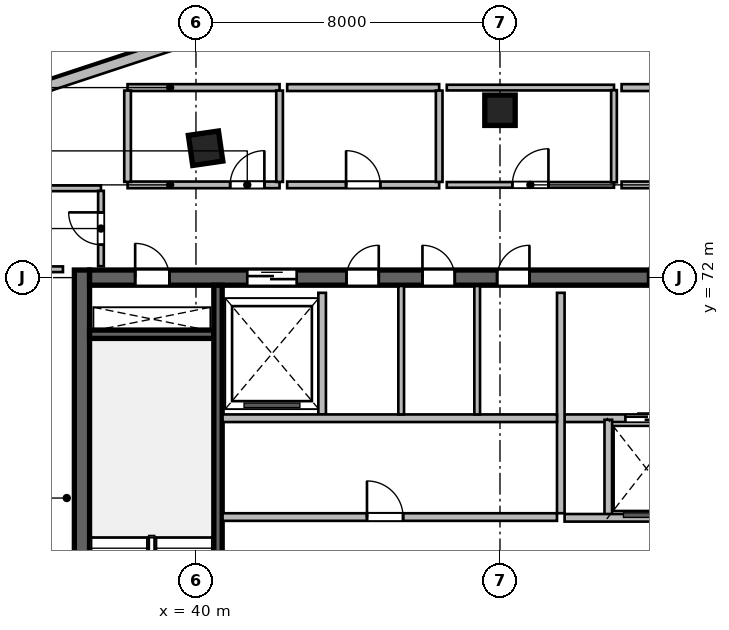
"""IFC4 building model, lengths in metres.
Left out: names, types, materials, properties, quantities, classifications, styles, units other than length and angle.
Written with IfcOpenShell. Run it as: python <this file> out.ifc"""

import sys

from ifc_helpers import new_model, si_unit, direction, frame, frame_2d, origin, origin_2d, place, context, subcontext, project, spatial, rectangle, extrude, source, transform, mapped, element, fill, save


model = new_model("IFC4")
c1 = context("Model", 3, precision=1e-05, world=origin(), true_north=direction((0.0, 1.0)))
c2 = subcontext(c1, "Body", "Model", "MODEL_VIEW")
j1 = project(units=[si_unit("LENGTHUNIT", "METRE"), si_unit("PLANEANGLEUNIT", "RADIAN")], contexts=[c1])
p1 = place(None, origin())
s1 = spatial("IfcSite", under=j1, at=p1, CompositionType="ELEMENT")
p2 = place(p1, origin())
s2 = spatial("IfcBuilding", under=s1, at=p2, CompositionType="ELEMENT")
p3 = place(p2, frame((0.0, 0.0, 271.8)))
s3 = spatial("IfcBuildingStorey", under=s2, at=p3, CompositionType="ELEMENT", Elevation=271.8)
m1 = source(origin(), c2, "Body", "SweptSolid", [
    extrude(rectangle(XDim=12.0, YDim=0.4, at=frame_2d((6.0, 0.0))), origin(), (0.0, 0.0, 1.0), 3.9),
])
p4 = place(p3, frame((37.0, 60.2, 0.0), z_axis=(0.0, 0.0, 1.0), x_axis=(0.0, 1.0, 0.0)))
e1 = element("IfcWall", 1, at=p4, inside=s3, PredefinedType="SHEAR", context=c2, shape_type="MappedRepresentation", body=[
    mapped(m1, transform((0.0, 0.0, 0.0), scale=1.0)),
])
m2 = source(origin(), c2, "Body", "SweptSolid", [
    extrude(rectangle(XDim=21.6, YDim=0.4, at=frame_2d((10.8, 0.0))), origin(), (0.0, 0.0, 1.0), 3.9),
])
p5 = place(p3, frame((37.2, 72.0, 0.0), z_axis=(0.0, 0.0, 1.0), x_axis=(1.0, 0.0, 0.0)))
e2 = element("IfcWall", 2, at=p5, inside=s3, PredefinedType="SHEAR", context=c2, shape_type="MappedRepresentation", body=[
    mapped(m2, transform((0.0, 0.0, 0.0), scale=1.0)),
])
p6 = place(p5, frame((1.2, 0.0, 0.0)))
e3 = element("IfcOpeningElement", 3, at=p6, cuts=e2, PredefinedType="OPENING", context=c2, shape_type="SweptSolid", body=[
    extrude(rectangle(XDim=0.9, YDim=2.1, at=frame_2d((0.45, 1.05))), frame((0.0, 0.21, 0.0), z_axis=(0.0, -1.0, 0.0), x_axis=(1.0, 0.0, 0.0)), (0.0, 0.0, 1.0), 0.42),
])
p7 = place(p5, frame((14.7, 0.0, 0.0)))
e4 = element("IfcOpeningElement", 4, at=p7, cuts=e2, PredefinedType="OPENING", context=c2, shape_type="SweptSolid", body=[
    extrude(rectangle(XDim=1.2, YDim=2.15, at=frame_2d((0.6, 1.075))), frame((0.0, 0.21, 0.0), z_axis=(0.0, -1.0, 0.0), x_axis=(1.0, 0.0, 0.0)), (0.0, 0.0, 1.0), 0.42),
])
p8 = place(p5, frame((4.15, 0.0, 0.0)))
e5 = element("IfcOpeningElement", 5, at=p8, cuts=e2, PredefinedType="OPENING", context=c2, shape_type="SweptSolid", body=[
    extrude(rectangle(XDim=1.3, YDim=2.15, at=frame_2d((0.65, 1.075))), frame((0.0, 0.21, 0.0), z_axis=(0.0, -1.0, 0.0), x_axis=(1.0, 0.0, 0.0)), (0.0, 0.0, 1.0), 0.42),
])
p9 = place(p5, frame((6.76, 0.0, 0.0)))
e6 = element("IfcOpeningElement", 6, at=p9, cuts=e2, PredefinedType="OPENING", context=c2, shape_type="SweptSolid", body=[
    extrude(rectangle(XDim=0.85, YDim=2.1, at=frame_2d((0.425, 1.05))), frame((0.0, 0.21, 0.0), z_axis=(0.0, -1.0, 0.0), x_axis=(1.0, 0.0, 0.0)), (0.0, 0.0, 1.0), 0.42),
])
p10 = place(p5, frame((8.76, 0.0, 0.0)))
e7 = element("IfcOpeningElement", 7, at=p10, cuts=e2, PredefinedType="OPENING", context=c2, shape_type="SweptSolid", body=[
    extrude(rectangle(XDim=0.85, YDim=2.1, at=frame_2d((0.425, 1.05))), frame((0.0, 0.21, 0.0), z_axis=(0.0, -1.0, 0.0), x_axis=(1.0, 0.0, 0.0)), (0.0, 0.0, 1.0), 0.42),
])
p11 = place(p5, frame((10.725, 0.0, 0.0)))
e8 = element("IfcOpeningElement", 8, at=p11, cuts=e2, PredefinedType="OPENING", context=c2, shape_type="SweptSolid", body=[
    extrude(rectangle(XDim=0.85, YDim=2.1, at=frame_2d((0.425, 1.05))), frame((0.0, 0.21, 0.0), z_axis=(0.0, -1.0, 0.0), x_axis=(1.0, 0.0, 0.0)), (0.0, 0.0, 1.0), 0.42),
])
m3 = source(origin(), c2, "Body", "SweptSolid", [
    extrude(rectangle(XDim=3.27, YDim=0.22, at=frame_2d((1.635, 0.0))), origin(), (0.0, 0.0, 1.0), 3.9),
])
p12 = place(p3, frame((37.2, 70.51, 0.0), z_axis=(0.0, 0.0, 1.0), x_axis=(1.0, 0.0, 0.0)))
e9 = element("IfcWall", 9, at=p12, inside=s3, PredefinedType="SHEAR", context=c2, shape_type="MappedRepresentation", body=[
    mapped(m3, transform((0.0, 0.0, 0.0), scale=1.0)),
])
m4 = source(origin(), c2, "Body", "SweptSolid", [
    extrude(rectangle(XDim=11.2, YDim=0.22, at=frame_2d((5.6, 0.0))), origin(), (0.0, 0.0, 1.0), 3.9),
])
p13 = place(p3, frame((40.58, 60.6, 0.0), z_axis=(0.0, 0.0, 1.0), x_axis=(0.0, 1.0, 0.0)))
e10 = element("IfcWall", 10, at=p13, inside=s3, PredefinedType="SHEAR", context=c2, shape_type="MappedRepresentation", body=[
    mapped(m4, transform((0.0, 0.0, 0.0), scale=1.0)),
])
m5 = source(origin(), c2, "Body", "SweptSolid", [
    extrude(rectangle(XDim=0.8, YDim=0.8, at=origin_2d()), origin(), (0.0, 0.0, 1.0), 3.9),
])
for number, where, z_axis, x_axis in (
    (11, (40.253, 75.404, 0.0), (0.0, 0.0, 1.0), (-0.143, 0.99, 0.0)),
    (12, (48.0, 76.404, 0.0), (0.0, 0.0, 1.0), (0.0, 1.0, 0.0)),
):
    element("IfcColumn", number, at=place(p3, frame(where, z_axis=z_axis, x_axis=x_axis)), inside=s3, PredefinedType="COLUMN", context=c2, shape_type="MappedRepresentation", body=[
        mapped(m5, transform((0.0, 0.0, 0.0), scale=1.0)),
    ])
m6 = source(origin(), c2, "Body", "SweptSolid", [
    extrude(rectangle(XDim=3.54, YDim=0.28, at=frame_2d((1.77, 0.0))), origin(), (0.0, 0.0, 1.0), 3.64),
])
p14 = place(p3, frame((36.132, 77.049, 0.0), z_axis=(0.0, 0.0, 1.0), x_axis=(0.949678507031, 0.313226329165, 0.0)))
e13 = element("IfcWall", 13, at=p14, inside=s3, PredefinedType="SOLIDWALL", context=c2, shape_type="MappedRepresentation", body=[
    mapped(m6, transform((0.0, 0.0, 0.0), scale=1.0)),
])
m7 = source(origin(), c2, "Body", "SweptSolid", [
    extrude(rectangle(XDim=5.62, YDim=0.2, at=frame_2d((2.81, 0.0))), origin(), (0.0, 0.0, 1.0), 3.64),
])
p15 = place(p3, frame((49.7, 68.3, 0.0), z_axis=(0.0, 0.0, 1.0), x_axis=(1.0, 0.0, 0.0)))
e14 = element("IfcWall", 14, at=p15, inside=s3, PredefinedType="SOLIDWALL", context=c2, shape_type="MappedRepresentation", body=[
    mapped(m7, transform((0.0, 0.0, 0.0), scale=1.0)),
])
p16 = place(p15, frame((1.6, 0.0, 0.0)))
e15 = element("IfcOpeningElement", 15, at=p16, cuts=e14, PredefinedType="OPENING", context=c2, shape_type="SweptSolid", body=[
    extrude(rectangle(XDim=1.1, YDim=2.15, at=frame_2d((0.55, 1.075))), frame((0.0, 0.11, 0.0), z_axis=(0.0, -1.0, 0.0), x_axis=(1.0, 0.0, 0.0)), (0.0, 0.0, 1.0), 0.22),
])
p17 = place(p15, frame((3.7, 0.0, 0.0)))
e16 = element("IfcOpeningElement", 16, at=p17, cuts=e14, PredefinedType="OPENING", context=c2, shape_type="SweptSolid", body=[
    extrude(rectangle(XDim=1.1, YDim=2.15, at=frame_2d((0.55, 1.075))), frame((0.0, 0.11, 0.0), z_axis=(0.0, -1.0, 0.0), x_axis=(1.0, 0.0, 0.0)), (0.0, 0.0, 1.0), 0.22),
])
m8 = source(origin(), c2, "Body", "SweptSolid", [
    extrude(rectangle(XDim=5.8, YDim=0.2, at=frame_2d((2.9, 0.0))), origin(), (0.0, 0.0, 1.0), 3.64),
])
p18 = place(p3, frame((49.6, 65.8, 0.0), z_axis=(0.0, 0.0, 1.0), x_axis=(0.0, 1.0, 0.0)))
e17 = element("IfcWall", 17, at=p18, inside=s3, PredefinedType="SOLIDWALL", context=c2, shape_type="MappedRepresentation", body=[
    mapped(m8, transform((0.0, 0.0, 0.0), scale=1.0)),
])
m9 = source(origin(), c2, "Body", "SweptSolid", [
    extrude(rectangle(XDim=2.58, YDim=0.2, at=frame_2d((1.29, 0.0))), origin(), (0.0, 0.0, 1.0), 3.64),
])
p19 = place(p3, frame((50.85, 65.68, 0.0), z_axis=(0.0, 0.0, 1.0), x_axis=(0.0, 1.0, 0.0)))
e18 = element("IfcWall", 18, at=p19, inside=s3, PredefinedType="SOLIDWALL", context=c2, shape_type="MappedRepresentation", body=[
    mapped(m9, transform((0.0, 0.0, 0.0), scale=1.0)),
])
p20 = place(p3, frame((49.7, 65.68, 0.0), z_axis=(0.0, 0.0, 1.0), x_axis=(1.0, 0.0, 0.0)))
e19 = element("IfcWall", 19, at=p20, inside=s3, PredefinedType="SOLIDWALL", context=c2, shape_type="MappedRepresentation", body=[
    mapped(m7, transform((0.0, 0.0, 0.0), scale=1.0)),
])
m10 = source(origin(), c2, "Body", "SweptSolid", [
    extrude(rectangle(XDim=3.2, YDim=0.2, at=frame_2d((1.6, 0.0))), origin(), (0.0, 0.0, 1.0), 3.64),
])
p21 = place(p3, frame((43.32, 68.4, 0.0), z_axis=(0.0, 0.0, 1.0), x_axis=(0.0, 1.0, 0.0)))
e20 = element("IfcWall", 20, at=p21, inside=s3, PredefinedType="SOLIDWALL", context=c2, shape_type="MappedRepresentation", body=[
    mapped(m10, transform((0.0, 0.0, 0.0), scale=1.0)),
])
m11 = source(origin(), c2, "Body", "SweptSolid", [
    extrude(rectangle(XDim=8.8, YDim=0.2, at=frame_2d((4.4, 0.0))), origin(), (0.0, 0.0, 1.0), 3.64),
])
p22 = place(p3, frame((40.7, 68.3, 0.0), z_axis=(0.0, 0.0, 1.0), x_axis=(1.0, 0.0, 0.0)))
e21 = element("IfcWall", 21, at=p22, inside=s3, PredefinedType="SOLIDWALL", context=c2, shape_type="MappedRepresentation", body=[
    mapped(m11, transform((0.0, 0.0, 0.0), scale=1.0)),
])
m12 = source(origin(), c2, "Body", "SweptSolid", [
    extrude(rectangle(XDim=3.38, YDim=0.15, at=frame_2d((1.69, 0.0))), origin(), (0.0, 0.0, 1.0), 3.64),
])
for number, where, z_axis, x_axis in (
    (22, (45.4, 68.4, 0.0), (0.0, 0.0, 1.0), (0.0, 1.0, 0.0)),
    (23, (47.4, 68.4, 0.0), (0.0, 0.0, 1.0), (0.0, 1.0, 0.0)),
):
    element("IfcWall", number, at=place(p3, frame(where, z_axis=z_axis, x_axis=x_axis)), inside=s3, PredefinedType="PARTITIONING", context=c2, shape_type="MappedRepresentation", body=[
        mapped(m12, transform((0.0, 0.0, 0.0), scale=1.0)),
    ])
p23 = place(p3, frame((40.7, 65.7, 0.0), z_axis=(0.0, 0.0, 1.0), x_axis=(1.0, 0.0, 0.0)))
e24 = element("IfcWall", 24, at=p23, inside=s3, PredefinedType="SOLIDWALL", context=c2, shape_type="MappedRepresentation", body=[
    mapped(m11, transform((0.0, 0.0, 0.0), scale=1.0)),
])
p24 = place(p23, frame((3.8, 0.0, 0.0)))
e25 = element("IfcOpeningElement", 25, at=p24, cuts=e24, PredefinedType="OPENING", context=c2, shape_type="SweptSolid", body=[
    extrude(rectangle(XDim=0.95, YDim=2.15, at=frame_2d((0.475, 1.075))), frame((0.0, 0.11, 0.0), z_axis=(0.0, -1.0, 0.0), x_axis=(1.0, 0.0, 0.0)), (0.0, 0.0, 1.0), 0.22),
])
m13 = source(origin(), c2, "Body", "SweptSolid", [
    extrude(rectangle(XDim=2.1, YDim=0.15, at=frame_2d((1.05, 0.0))), origin(), (0.0, 0.0, 1.0), 3.64),
])
p25 = place(p3, frame((34.4, 72.22, 0.0), z_axis=(0.0, 0.0, 1.0), x_axis=(1.0, 0.0, 0.0)))
e26 = element("IfcWall", 26, at=p25, inside=s3, PredefinedType="PARTITIONING", context=c2, shape_type="MappedRepresentation", body=[
    mapped(m13, transform((0.0, 0.0, 0.0), scale=1.0)),
])
m14 = source(origin(), c2, "Body", "SweptSolid", [
    extrude(rectangle(XDim=3.1, YDim=0.15, at=frame_2d((1.55, 0.0))), origin(), (0.0, 0.0, 1.0), 3.071),
])
p26 = place(p3, frame((34.4, 74.35, 0.0), z_axis=(0.0, 0.0, 1.0), x_axis=(1.0, 0.0, 0.0)))
e27 = element("IfcWall", 27, at=p26, inside=s3, PredefinedType="PARTITIONING", context=c2, shape_type="MappedRepresentation", body=[
    mapped(m14, transform((0.0, 0.0, 0.0), scale=1.0)),
])
m15 = source(origin(), c2, "Body", "SweptSolid", [
    extrude(rectangle(XDim=1.982, YDim=0.15, at=frame_2d((0.991, 0.0))), origin(), (0.0, 0.0, 1.0), 3.64),
])
p27 = place(p3, frame((37.5, 72.3, 0.0), z_axis=(0.0, 0.0, 1.0), x_axis=(0.0, 1.0, 0.0)))
e28 = element("IfcWall", 28, at=p27, inside=s3, PredefinedType="PARTITIONING", context=c2, shape_type="MappedRepresentation", body=[
    mapped(m15, transform((0.0, 0.0, 0.0), scale=1.0)),
])
p28 = place(p27, frame((0.566, 0.0, 0.0)))
e29 = element("IfcOpeningElement", 29, at=p28, cuts=e28, PredefinedType="OPENING", context=c2, shape_type="SweptSolid", body=[
    extrude(rectangle(XDim=0.85, YDim=2.1, at=frame_2d((0.425, 1.05))), frame((0.0, 0.085, 0.0), z_axis=(0.0, -1.0, 0.0), x_axis=(1.0, 0.0, 0.0)), (0.0, 0.0, 1.0), 0.17),
])
m16 = source(origin(), c2, "Body", "SweptSolid", [
    extrude(rectangle(XDim=4.0, YDim=0.175, at=frame_2d((2.0, 0.0))), origin(), (0.0, 0.0, 1.0), 3.64),
])
p29 = place(p3, frame((38.2, 74.44, 0.0), z_axis=(0.0, 0.0, 1.0), x_axis=(1.0, 0.0, 0.0)))
e30 = element("IfcWall", 30, at=p29, inside=s3, PredefinedType="PARTITIONING", context=c2, shape_type="MappedRepresentation", body=[
    mapped(m16, transform((0.0, 0.0, 0.0), scale=1.0)),
])
p30 = place(p29, frame((2.7, 0.0, 0.0)))
e31 = element("IfcOpeningElement", 31, at=p30, cuts=e30, PredefinedType="OPENING", context=c2, shape_type="SweptSolid", body=[
    extrude(rectangle(XDim=0.9, YDim=2.08, at=frame_2d((0.45, 1.04))), frame((0.0, 0.098, 0.0), z_axis=(0.0, -1.0, 0.0), x_axis=(1.0, 0.0, 0.0)), (0.0, 0.0, 1.0), 0.195),
])
m17 = source(origin(), c2, "Body", "SweptSolid", [
    extrude(rectangle(XDim=4.0, YDim=0.18, at=frame_2d((2.0, 0.0))), origin(), (0.0, 0.0, 1.0), 3.64),
])
p31 = place(p3, frame((38.2, 77.0, 0.0), z_axis=(0.0, 0.0, 1.0), x_axis=(1.0, 0.0, 0.0)))
e32 = element("IfcWall", 32, at=p31, inside=s3, PredefinedType="PLUMBINGWALL", context=c2, shape_type="MappedRepresentation", body=[
    mapped(m17, transform((0.0, 0.0, 0.0), scale=1.0)),
])
m18 = source(origin(), c2, "Body", "SweptSolid", [
    extrude(rectangle(XDim=2.403, YDim=0.175, at=frame_2d((1.201, 0.0))), origin(), (0.0, 0.0, 1.0), 3.64),
])
for number, where, z_axis, x_axis in (
    (33, (38.2, 74.519, 0.0), (0.0, 0.0, 1.0), (0.0, 1.0, 0.0)),
    (34, (42.2, 74.519, 0.0), (0.0, 0.0, 1.0), (0.0, 1.0, 0.0)),
):
    element("IfcWall", number, at=place(p3, frame(where, z_axis=z_axis, x_axis=x_axis)), inside=s3, PredefinedType="PARTITIONING", context=c2, shape_type="MappedRepresentation", body=[
        mapped(m18, transform((0.0, 0.0, 0.0), scale=1.0)),
    ])
p32 = place(p3, frame((42.4, 74.44, 0.0), z_axis=(0.0, 0.0, 1.0), x_axis=(1.0, 0.0, 0.0)))
e35 = element("IfcWall", 35, at=p32, inside=s3, PredefinedType="PARTITIONING", context=c2, shape_type="MappedRepresentation", body=[
    mapped(m16, transform((0.0, 0.0, 0.0), scale=1.0)),
])
p33 = place(p32, frame((1.55, 0.0, 0.0)))
e36 = element("IfcOpeningElement", 36, at=p33, cuts=e35, PredefinedType="OPENING", context=c2, shape_type="SweptSolid", body=[
    extrude(rectangle(XDim=0.9, YDim=2.08, at=frame_2d((0.45, 1.04))), frame((0.0, 0.098, 0.0), z_axis=(0.0, -1.0, 0.0), x_axis=(1.0, 0.0, 0.0)), (0.0, 0.0, 1.0), 0.195),
])
p34 = place(p3, frame((42.4, 77.0, 0.0), z_axis=(0.0, 0.0, 1.0), x_axis=(1.0, 0.0, 0.0)))
e37 = element("IfcWall", 37, at=p34, inside=s3, PredefinedType="PLUMBINGWALL", context=c2, shape_type="MappedRepresentation", body=[
    mapped(m17, transform((0.0, 0.0, 0.0), scale=1.0)),
])
p35 = place(p3, frame((46.4, 74.519, 0.0), z_axis=(0.0, 0.0, 1.0), x_axis=(0.0, 1.0, 0.0)))
e38 = element("IfcWall", 38, at=p35, inside=s3, PredefinedType="PARTITIONING", context=c2, shape_type="MappedRepresentation", body=[
    mapped(m18, transform((0.0, 0.0, 0.0), scale=1.0)),
])
m19 = source(origin(), c2, "Body", "SweptSolid", [
    extrude(rectangle(XDim=4.4, YDim=0.15, at=frame_2d((2.2, 0.0))), origin(), (0.0, 0.0, 1.0), 3.64),
])
p36 = place(p3, frame((46.6, 74.44, 0.0), z_axis=(0.0, 0.0, 1.0), x_axis=(1.0, 0.0, 0.0)))
e39 = element("IfcWall", 39, at=p36, inside=s3, PredefinedType="PARTITIONING", context=c2, shape_type="MappedRepresentation", body=[
    mapped(m19, transform((0.0, 0.0, 0.0), scale=1.0)),
])
p37 = place(p36, frame((1.725, 0.0, 0.0)))
e40 = element("IfcOpeningElement", 40, at=p37, cuts=e39, PredefinedType="OPENING", context=c2, shape_type="SweptSolid", body=[
    extrude(rectangle(XDim=0.95, YDim=2.1, at=frame_2d((0.475, 1.05))), frame((0.0, 0.085, 0.0), z_axis=(0.0, -1.0, 0.0), x_axis=(1.0, 0.0, 0.0)), (0.0, 0.0, 1.0), 0.17),
])
p38 = place(p3, frame((46.6, 77.0, 0.0), z_axis=(0.0, 0.0, 1.0), x_axis=(1.0, 0.0, 0.0)))
e41 = element("IfcWall", 41, at=p38, inside=s3, PredefinedType="PARTITIONING", context=c2, shape_type="MappedRepresentation", body=[
    mapped(m19, transform((0.0, 0.0, 0.0), scale=1.0)),
])
m20 = source(origin(), c2, "Body", "SweptSolid", [
    extrude(rectangle(XDim=2.425, YDim=0.15, at=frame_2d((1.212, 0.0))), origin(), (0.0, 0.0, 1.0), 3.64),
])
p39 = place(p3, frame((51.0, 74.508, 0.0), z_axis=(0.0, 0.0, 1.0), x_axis=(0.0, 1.0, 0.0)))
e42 = element("IfcWall", 42, at=p39, inside=s3, PredefinedType="PARTITIONING", context=c2, shape_type="MappedRepresentation", body=[
    mapped(m20, transform((0.0, 0.0, 0.0), scale=1.0)),
])
m21 = source(origin(), c2, "Body", "SweptSolid", [
    extrude(rectangle(XDim=4.2, YDim=0.175, at=frame_2d((2.1, 0.0))), origin(), (0.0, 0.0, 1.0), 3.64),
])
p40 = place(p3, frame((51.2, 74.44, 0.0), z_axis=(0.0, 0.0, 1.0), x_axis=(1.0, 0.0, 0.0)))
e43 = element("IfcWall", 43, at=p40, inside=s3, PredefinedType="PARTITIONING", context=c2, shape_type="MappedRepresentation", body=[
    mapped(m21, transform((0.0, 0.0, 0.0), scale=1.0)),
])
p41 = place(p40, frame((1.625, 0.0, 0.0)))
e44 = element("IfcOpeningElement", 44, at=p41, cuts=e43, PredefinedType="OPENING", context=c2, shape_type="SweptSolid", body=[
    extrude(rectangle(XDim=0.95, YDim=2.12, at=frame_2d((0.475, 1.06))), frame((0.0, 0.098, 0.0), z_axis=(0.0, -1.0, 0.0), x_axis=(1.0, 0.0, 0.0)), (0.0, 0.0, 1.0), 0.195),
])
m22 = source(origin(), c2, "Body", "SweptSolid", [
    extrude(rectangle(XDim=4.2, YDim=0.18, at=frame_2d((2.1, 0.0))), origin(), (0.0, 0.0, 1.0), 3.64),
])
p42 = place(p3, frame((51.2, 77.0, 0.0), z_axis=(0.0, 0.0, 1.0), x_axis=(1.0, 0.0, 0.0)))
e45 = element("IfcWall", 45, at=p42, inside=s3, PredefinedType="PLUMBINGWALL", context=c2, shape_type="MappedRepresentation", body=[
    mapped(m22, transform((0.0, 0.0, 0.0), scale=1.0)),
])
m23 = source(origin(), c2, "Body", "SweptSolid", [
    extrude(rectangle(XDim=12.909, YDim=0.15, at=frame_2d((6.454, 0.0))), origin(), (0.0, 0.0, 1.0), 3.64),
])
p43 = place(p3, frame((36.5, 63.216, 0.0), z_axis=(0.0, 0.0, 1.0), x_axis=(-0.268750817191, 0.963209737419, 0.0)))
e46 = element("IfcWall", 46, at=p43, inside=s3, PredefinedType="PARTITIONING", context=c2, shape_type="MappedRepresentation", body=[
    mapped(m23, transform((0.0, 0.0, 0.0), scale=1.0)),
])
m24 = source(origin(), c2, "Body", "SweptSolid", [
    extrude(rectangle(XDim=0.9, YDim=2.1, at=frame_2d((0.45, 1.05))), frame((0.0, 0.025, 0.0), z_axis=(0.0, -1.0, 0.0), x_axis=(1.0, 0.0, 0.0)), (0.0, 0.0, 1.0), 0.05),
])
p44 = place(p6, origin())
e47 = element("IfcDoor", 47, at=p44, inside=s3, OperationType="SINGLE_SWING_LEFT", PredefinedType="DOOR", context=c2, shape_type="MappedRepresentation", body=[
    mapped(m24, transform((0.0, 0.0, 0.0), scale=1.0)),
])
fill(e3, e47)
m25 = source(origin(), c2, "Body", "SweptSolid", [
    extrude(rectangle(XDim=1.2, YDim=2.15, at=frame_2d((0.6, 1.075))), frame((0.0, 0.025, 0.0), z_axis=(0.0, -1.0, 0.0), x_axis=(1.0, 0.0, 0.0)), (0.0, 0.0, 1.0), 0.05),
])
p45 = place(p7, origin())
e48 = element("IfcDoor", 48, at=p45, inside=s3, OperationType="SINGLE_SWING_RIGHT", PredefinedType="DOOR", context=c2, shape_type="MappedRepresentation", body=[
    mapped(m25, transform((0.0, 0.0, 0.0), scale=1.0)),
])
fill(e4, e48)
m26 = source(origin(), c2, "Body", "SweptSolid", [
    extrude(rectangle(XDim=1.1, YDim=2.15, at=frame_2d((0.55, 1.075))), frame((0.0, 0.025, 0.0), z_axis=(0.0, -1.0, 0.0), x_axis=(1.0, 0.0, 0.0)), (0.0, 0.0, 1.0), 0.05),
])
p46 = place(p16, origin())
e49 = element("IfcDoor", 49, at=p46, inside=s3, OperationType="DOUBLE_DOOR_SLIDING", PredefinedType="DOOR", context=c2, shape_type="MappedRepresentation", body=[
    mapped(m26, transform((0.0, 0.0, 0.0), scale=1.0)),
])
fill(e15, e49)
m27 = source(origin(), c2, "Body", "SweptSolid", [
    extrude(rectangle(XDim=1.3, YDim=2.15, at=frame_2d((0.65, 1.075))), frame((0.0, 0.025, 0.0), z_axis=(0.0, -1.0, 0.0), x_axis=(1.0, 0.0, 0.0)), (0.0, 0.0, 1.0), 0.05),
])
p47 = place(p8, origin())
e50 = element("IfcDoor", 50, at=p47, inside=s3, OperationType="DOUBLE_DOOR_SLIDING", PredefinedType="DOOR", context=c2, shape_type="MappedRepresentation", body=[
    mapped(m27, transform((0.0, 0.0, 0.0), scale=1.0)),
])
fill(e5, e50)
m28 = source(origin(), c2, "Body", "SweptSolid", [
    extrude(rectangle(XDim=0.85, YDim=2.1, at=frame_2d((0.425, 1.05))), frame((0.0, 0.025, 0.0), z_axis=(0.0, -1.0, 0.0), x_axis=(1.0, 0.0, 0.0)), (0.0, 0.0, 1.0), 0.05),
])
p48 = place(p9, origin())
e51 = element("IfcDoor", 51, at=p48, inside=s3, OperationType="SINGLE_SWING_RIGHT", PredefinedType="DOOR", context=c2, shape_type="MappedRepresentation", body=[
    mapped(m28, transform((0.0, 0.0, 0.0), scale=1.0)),
])
fill(e6, e51)
p49 = place(p10, origin())
e52 = element("IfcDoor", 52, at=p49, inside=s3, OperationType="SINGLE_SWING_LEFT", PredefinedType="DOOR", context=c2, shape_type="MappedRepresentation", body=[
    mapped(m28, transform((0.0, 0.0, 0.0), scale=1.0)),
])
fill(e7, e52)
p50 = place(p11, origin())
e53 = element("IfcDoor", 53, at=p50, inside=s3, OperationType="SINGLE_SWING_RIGHT", PredefinedType="DOOR", context=c2, shape_type="MappedRepresentation", body=[
    mapped(m28, transform((0.0, 0.0, 0.0), scale=1.0)),
])
fill(e8, e53)
m29 = source(origin(), c2, "Body", "SweptSolid", [
    extrude(rectangle(XDim=0.95, YDim=2.15, at=frame_2d((0.475, 1.075))), frame((0.0, 0.025, 0.0), z_axis=(0.0, -1.0, 0.0), x_axis=(1.0, 0.0, 0.0)), (0.0, 0.0, 1.0), 0.05),
])
p51 = place(p24, origin())
e54 = element("IfcDoor", 54, at=p51, inside=s3, OperationType="SINGLE_SWING_LEFT", PredefinedType="DOOR", context=c2, shape_type="MappedRepresentation", body=[
    mapped(m29, transform((0.0, 0.0, 0.0), scale=1.0)),
])
fill(e25, e54)
p52 = place(p28, origin())
e55 = element("IfcDoor", 55, at=p52, inside=s3, OperationType="SINGLE_SWING_RIGHT", PredefinedType="DOOR", context=c2, shape_type="MappedRepresentation", body=[
    mapped(m28, transform((0.0, 0.0, 0.0), scale=1.0)),
])
fill(e29, e55)
m30 = source(origin(), c2, "Body", "SweptSolid", [
    extrude(rectangle(XDim=0.9, YDim=2.08, at=frame_2d((0.45, 1.04))), frame((0.0, 0.025, 0.0), z_axis=(0.0, -1.0, 0.0), x_axis=(1.0, 0.0, 0.0)), (0.0, 0.0, 1.0), 0.05),
])
p53 = place(p30, origin())
e56 = element("IfcDoor", 56, at=p53, inside=s3, OperationType="SINGLE_SWING_RIGHT", PredefinedType="DOOR", context=c2, shape_type="MappedRepresentation", body=[
    mapped(m30, transform((0.0, 0.0, 0.0), scale=1.0)),
])
fill(e31, e56)
p54 = place(p33, origin())
e57 = element("IfcDoor", 57, at=p54, inside=s3, OperationType="SINGLE_SWING_LEFT", PredefinedType="DOOR", context=c2, shape_type="MappedRepresentation", body=[
    mapped(m30, transform((0.0, 0.0, 0.0), scale=1.0)),
])
fill(e36, e57)
m31 = source(origin(), c2, "Body", "SweptSolid", [
    extrude(rectangle(XDim=0.95, YDim=2.1, at=frame_2d((0.475, 1.05))), frame((0.0, 0.025, 0.0), z_axis=(0.0, -1.0, 0.0), x_axis=(1.0, 0.0, 0.0)), (0.0, 0.0, 1.0), 0.05),
])
p55 = place(p37, origin())
e58 = element("IfcDoor", 58, at=p55, inside=s3, OperationType="SINGLE_SWING_RIGHT", PredefinedType="DOOR", context=c2, shape_type="MappedRepresentation", body=[
    mapped(m31, transform((0.0, 0.0, 0.0), scale=1.0)),
])
fill(e40, e58)
save(model, sys.argv[1])
